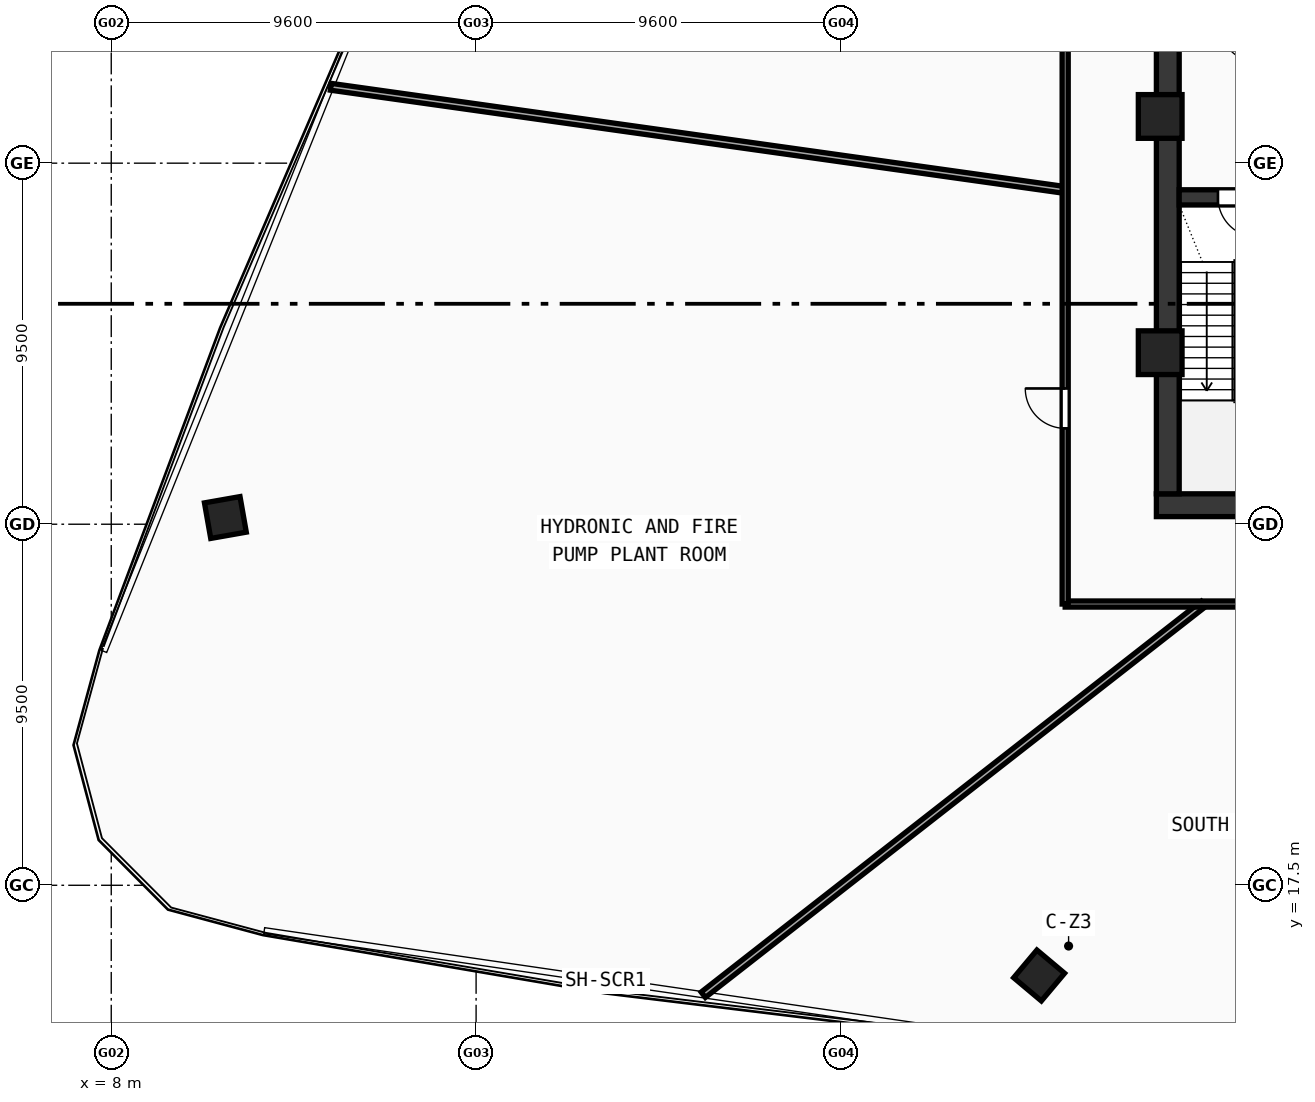
"""IFC4 building model, lengths in metres.
Left out: names, types, materials, properties, quantities, classifications, styles, units other than length and angle.
Written with IfcOpenShell. Run it as: python <this file> out.ifc"""

import sys

from ifc_helpers import new_model, si_unit, direction, frame, frame_2d, origin, origin_with_axes, origin_2d, place, context, subcontext, project, spatial, rectangle, hollow_rectangle, extrude, source, transform, mapped, element, fill, save


model = new_model("IFC4")
c1 = context("Model", 3, precision=1e-05, world=origin(), true_north=direction((0.0, 1.0)))
c2 = subcontext(c1, "Body", "Model", "MODEL_VIEW")
j1 = project(units=[si_unit("LENGTHUNIT", "METRE"), si_unit("PLANEANGLEUNIT", "RADIAN")], contexts=[c1])
p1 = place(None, origin())
s1 = spatial("IfcSite", under=j1, at=p1, CompositionType="ELEMENT")
p2 = place(p1, origin())
s2 = spatial("IfcBuilding", under=s1, at=p2, CompositionType="ELEMENT")
p3 = place(p2, frame((0.0, 0.0, 125.03)))
s3 = spatial("IfcBuildingStorey", under=s2, at=p3, CompositionType="ELEMENT", Elevation=125.03)
p4 = place(p3, frame((35.5, 27.5, 0.0), z_axis=(0.0, 0.0, 1.0), x_axis=(1.0, 0.0, 0.0)))
e1 = element("IfcWall", 1, at=p4, inside=s3, PredefinedType="SHEAR", context=c2, shape_type="SweptSolid", body=[
    extrude(rectangle(XDim=25.0, YDim=0.6, at=frame_2d((12.5, 0.0))), origin(), (0.0, 0.0, 1.0), 4.54),
])
p5 = place(p3, frame((35.8, 27.8, 0.0), z_axis=(0.0, 0.0, 1.0), x_axis=(0.0, 1.0, 0.0)))
e2 = element("IfcWall", 2, at=p5, inside=s3, PredefinedType="SHEAR", context=c2, shape_type="SweptSolid", body=[
    extrude(rectangle(XDim=12.1, YDim=0.6, at=frame_2d((6.05, 0.0))), origin(), (0.0, 0.0, 1.0), 4.54),
])
p6 = place(p3, frame((36.1, 35.6, 0.0), z_axis=(0.0, 0.0, 1.0), x_axis=(1.0, 0.0, 0.0)))
e3 = element("IfcWall", 3, at=p6, inside=s3, PredefinedType="SHEAR", context=c2, shape_type="SweptSolid", body=[
    extrude(rectangle(XDim=3.1, YDim=0.4, at=frame_2d((1.55, 0.0))), origin(), (0.0, 0.0, 1.0), 4.54),
])
p7 = place(p6, frame((1.02, 0.0, 0.0)))
e4 = element("IfcOpeningElement", 4, at=p7, cuts=e3, PredefinedType="OPENING", context=c2, shape_type="SweptSolid", body=[
    extrude(rectangle(XDim=1.05, YDim=2.1, at=frame_2d((0.525, 1.05))), frame((0.0, 0.21, 0.0), z_axis=(0.0, -1.0, 0.0), x_axis=(1.0, 0.0, 0.0)), (0.0, 0.0, 1.0), 0.42),
])
m1 = source(origin(), c2, "Body", "SweptSolid", [
    extrude(hollow_rectangle(XDim=1.15, YDim=1.15, WallThickness=0.048, at=origin_2d()), origin(), (0.0, 0.0, 1.0), 4.82),
])
for number, where, z_axis, x_axis in (
    (5, (35.6, 37.729, -0.28), (0.0, 0.0, 1.0), (1.0, 0.0, 0.0)),
    (6, (35.6, 31.513, -0.28), (0.0, 0.0, 1.0), (1.0, 0.0, 0.0)),
):
    element("IfcColumn", number, at=place(p3, frame(where, z_axis=z_axis, x_axis=x_axis)), inside=s3, PredefinedType="COLUMN", context=c2, shape_type="MappedRepresentation", body=[
        mapped(m1, transform((0.0, 0.0, 0.0), scale=1.0)),
    ])
m2 = source(origin(), c2, "Body", "SweptSolid", [
    extrude(hollow_rectangle(XDim=0.95, YDim=0.95, WallThickness=0.04, at=origin_2d()), origin(), (0.0, 0.0, 1.0), 4.82),
])
for number, where, z_axis, x_axis in (
    (7, (32.415, 15.126, -0.28), (0.0, 0.0, 1.0), (0.766, -0.643, 0.0)),
    (8, (11.003, 27.177, -0.28), (0.0, 0.0, 1.0), (0.174, -0.985, 0.0)),
):
    element("IfcColumn", number, at=place(p3, frame(where, z_axis=z_axis, x_axis=x_axis)), inside=s3, PredefinedType="COLUMN", context=c2, shape_type="MappedRepresentation", body=[
        mapped(m2, transform((0.0, 0.0, 0.0), scale=1.0)),
    ])
p8 = place(p3, frame((33.1, 35.794, 0.0), z_axis=(0.0, 0.0, 1.0), x_axis=(-0.990268733373, 0.13916837178, 0.0)))
e9 = element("IfcWall", 9, at=p8, inside=s3, PredefinedType="PARTITIONING", context=c2, shape_type="SweptSolid", body=[
    extrude(rectangle(XDim=19.513, YDim=0.18, at=frame_2d((9.756, 0.0))), origin(), (0.0, 0.0, 1.0), 3.89),
])
p9 = place(p3, frame((36.737, 24.9, 0.0), z_axis=(0.0, 0.0, 1.0), x_axis=(-0.788012847889, -0.615658794758, 0.0)))
e10 = element("IfcWall", 10, at=p9, inside=s3, PredefinedType="PARTITIONING", context=c2, shape_type="SweptSolid", body=[
    extrude(rectangle(XDim=16.699, YDim=0.18, at=frame_2d((8.35, 0.0))), origin(), (0.0, 0.0, 1.0), 3.89),
])
p10 = place(p3, frame((62.9, 24.9, 0.0), z_axis=(0.0, 0.0, 1.0), x_axis=(-1.0, 0.0, 0.0)))
e11 = element("IfcWall", 11, at=p10, inside=s3, PredefinedType="PARTITIONING", context=c2, shape_type="SweptSolid", body=[
    extrude(rectangle(XDim=29.8, YDim=0.16, at=frame_2d((14.9, 0.0))), origin(), (0.0, 0.0, 1.0), 3.89),
])
p11 = place(p10, frame((20.007, 0.0, 0.0)))
e12 = element("IfcOpeningElement", 12, at=p11, cuts=e11, PredefinedType="OPENING", context=c2, shape_type="SweptSolid", body=[
    extrude(rectangle(XDim=1.05, YDim=2.1, at=frame_2d((0.525, 1.05))), frame((0.0, 0.09, 0.0), z_axis=(0.0, -1.0, 0.0), x_axis=(1.0, 0.0, 0.0)), (0.0, 0.0, 1.0), 0.18),
])
p12 = place(p10, frame((8.743, 0.0, 0.0)))
e13 = element("IfcOpeningElement", 13, at=p12, cuts=e11, PredefinedType="OPENING", context=c2, shape_type="SweptSolid", body=[
    extrude(rectangle(XDim=1.05, YDim=2.1, at=frame_2d((0.525, 1.05))), frame((0.0, 0.09, 0.0), z_axis=(0.0, -1.0, 0.0), x_axis=(1.0, 0.0, 0.0)), (0.0, 0.0, 1.0), 0.18),
])
p13 = place(p3, frame((33.1, 24.9, 0.0), z_axis=(0.0, 0.0, 1.0), x_axis=(0.0, 1.0, 0.0)))
e14 = element("IfcWall", 14, at=p13, inside=s3, PredefinedType="PARTITIONING", context=c2, shape_type="SweptSolid", body=[
    extrude(rectangle(XDim=18.0, YDim=0.16, at=frame_2d((9.0, 0.0))), origin(), (0.0, 0.0, 1.0), 3.89),
])
p14 = place(p13, frame((4.622, 0.0, 0.0)))
e15 = element("IfcOpeningElement", 15, at=p14, cuts=e14, PredefinedType="OPENING", context=c2, shape_type="SweptSolid", body=[
    extrude(rectangle(XDim=1.05, YDim=2.1, at=frame_2d((0.525, 1.05))), frame((0.0, 0.09, 0.0), z_axis=(0.0, -1.0, 0.0), x_axis=(1.0, 0.0, 0.0)), (0.0, 0.0, 1.0), 0.18),
])
m3 = source(origin(), c2, "Body", "SweptSolid", [
    extrude(rectangle(XDim=1.05, YDim=2.1, at=frame_2d((0.525, 1.05))), frame((0.0, 0.025, 0.0), z_axis=(0.0, -1.0, 0.0), x_axis=(1.0, 0.0, 0.0)), (0.0, 0.0, 1.0), 0.05),
])
p15 = place(p7, frame((1.05, 0.0, 0.0), z_axis=(0.0, 0.0, 1.0), x_axis=(-1.0, 0.0, 0.0)))
e16 = element("IfcDoor", 16, at=p15, inside=s3, OperationType="SINGLE_SWING_LEFT", PredefinedType="DOOR", context=c2, shape_type="MappedRepresentation", body=[
    mapped(m3, transform((0.0, 0.0, 0.0), scale=1.0)),
])
fill(e4, e16)
p16 = place(p14, origin_with_axes())
e17 = element("IfcDoor", 17, at=p16, inside=s3, OperationType="SINGLE_SWING_RIGHT", PredefinedType="DOOR", context=c2, shape_type="MappedRepresentation", body=[
    mapped(m3, transform((0.0, 0.0, 0.0), scale=1.0)),
])
fill(e15, e17)
save(model, sys.argv[1])
